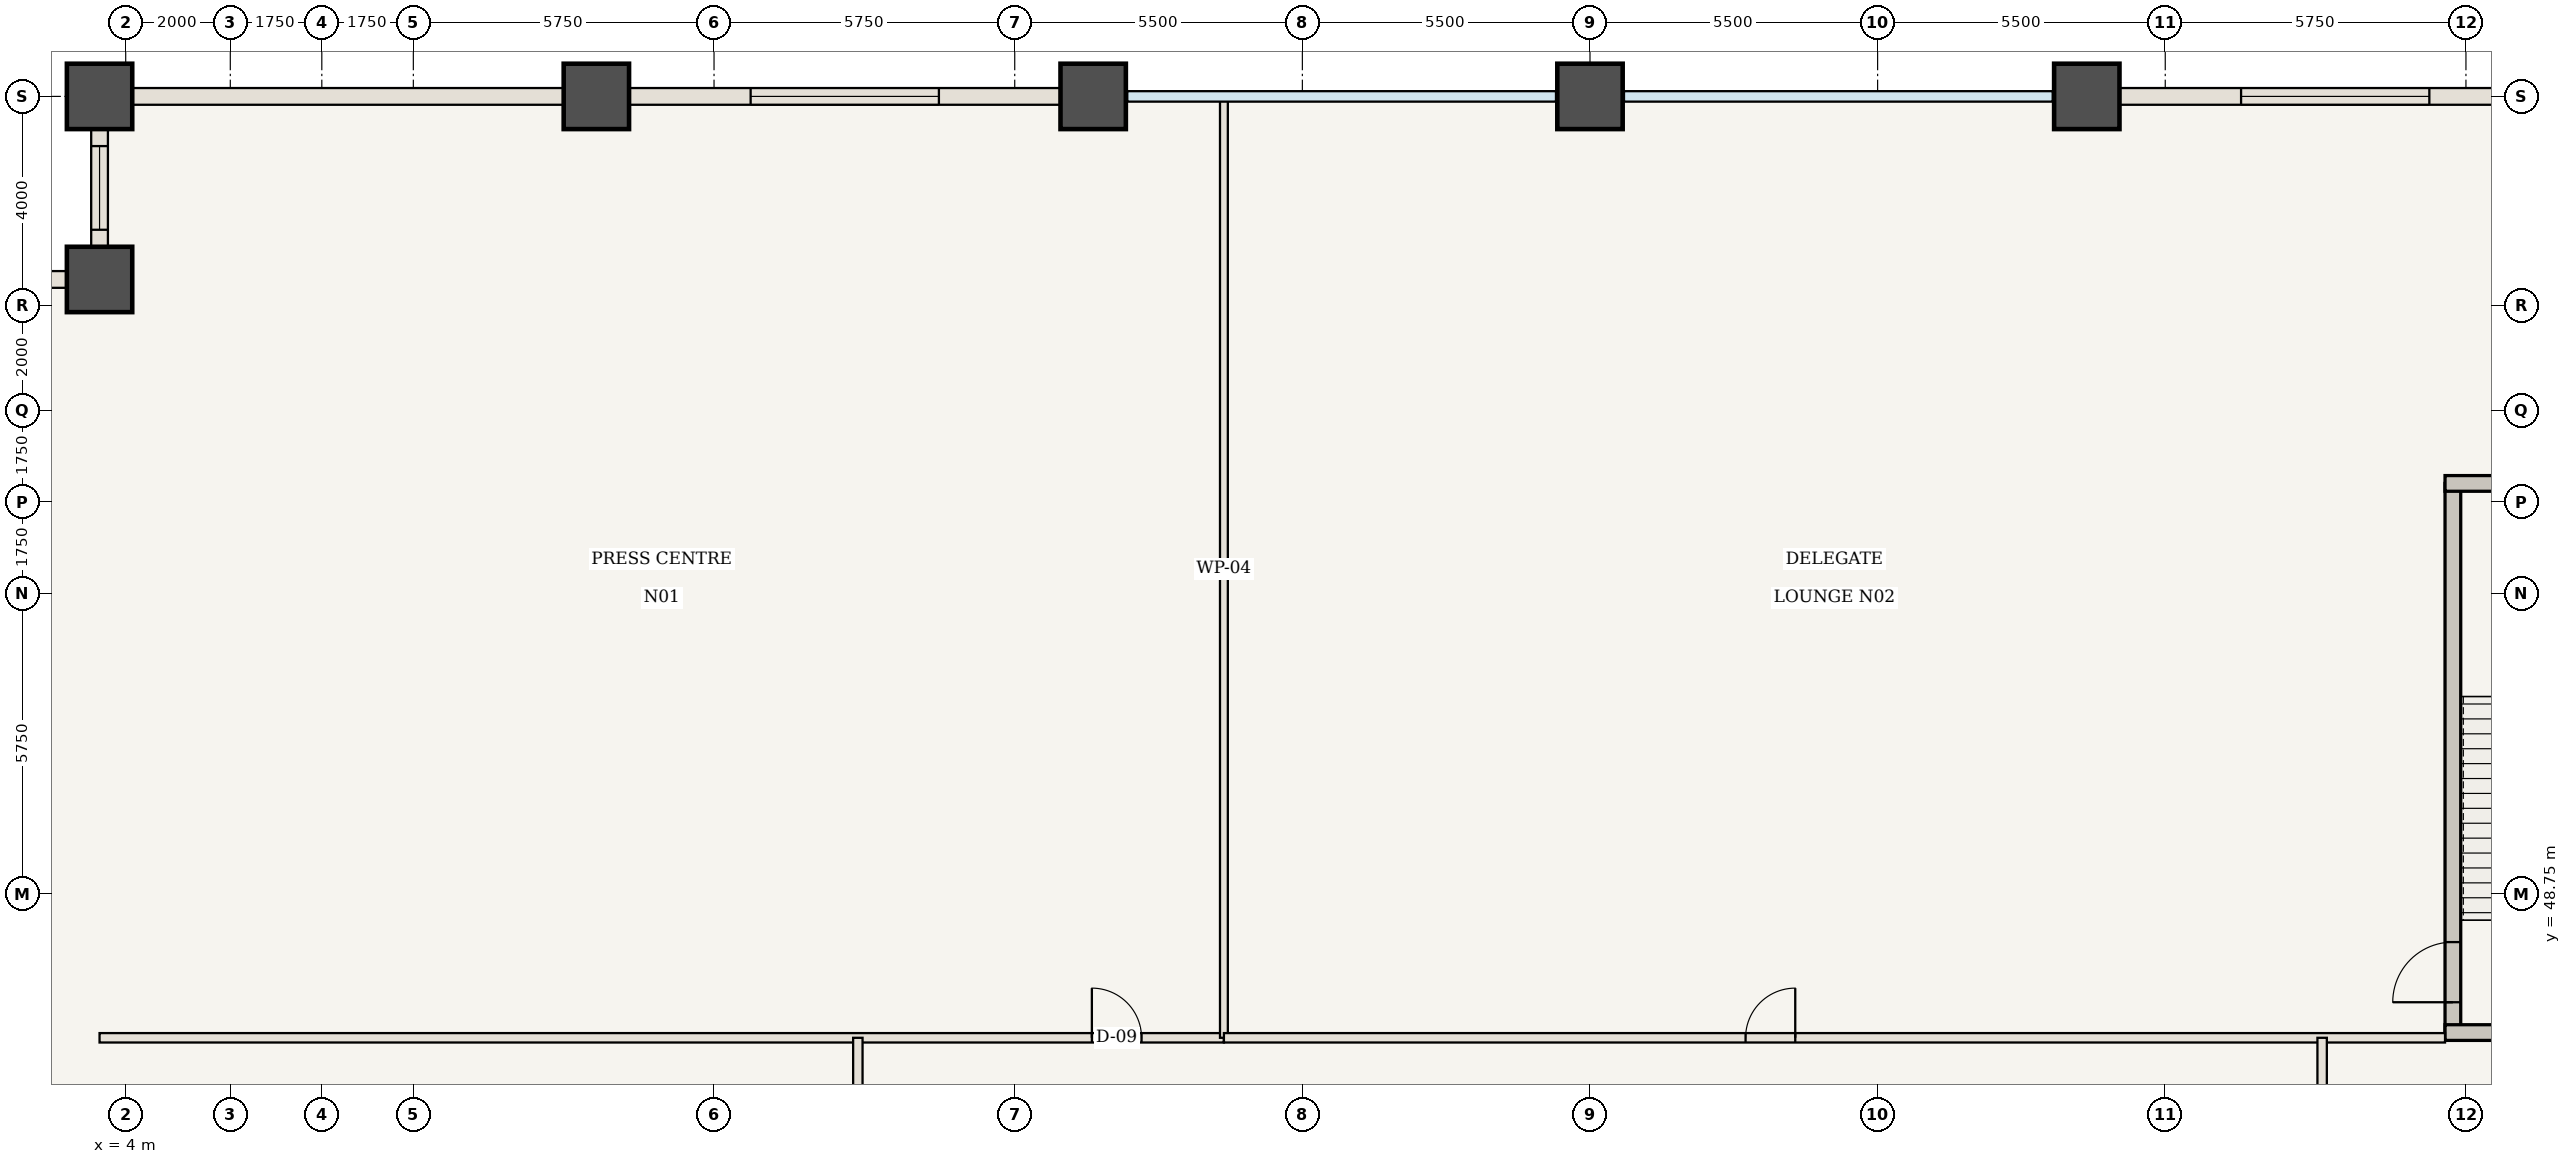
"""IFC4 building model, lengths in metres.
Left out: names, types, materials, properties, quantities, classifications, styles, units other than length and angle.
Written with IfcOpenShell. Run it as: python <this file> out.ifc"""

import sys

from ifc_helpers import new_model, si_unit, direction, frame, frame_2d, origin, origin_2d, place, context, subcontext, project, spatial, rectangle, extrude, element, fill, save


model = new_model("IFC4")
c1 = context("Model", 3, precision=1e-05, world=origin(), true_north=direction((0.0, 1.0)))
c2 = subcontext(c1, "Body", "Model", "MODEL_VIEW")
j1 = project(units=[si_unit("LENGTHUNIT", "METRE"), si_unit("PLANEANGLEUNIT", "RADIAN")], contexts=[c1])
p1 = place(None, origin())
s1 = spatial("IfcSite", under=j1, at=p1, CompositionType="ELEMENT")
p2 = place(p1, origin())
s2 = spatial("IfcBuilding", under=s1, at=p2, CompositionType="ELEMENT")
p3 = place(p2, frame((0.0, 0.0, 12.25)))
s3 = spatial("IfcBuildingStorey", under=s2, at=p3, CompositionType="ELEMENT", Elevation=12.25)
for number, where, z_axis, x_axis in (
    (1, (3.5, 64.0, 0.0), (0.0, 0.0, 1.0), (1.0, 0.0, 0.0)),
    (2, (3.5, 60.5, 0.0), (0.0, 0.0, 1.0), (1.0, 0.0, 0.0)),
    (3, (13.0, 64.0, 0.0), (0.0, 0.0, 1.0), (1.0, 0.0, 0.0)),
    (4, (22.5, 64.0, 0.0), (0.0, 0.0, 1.0), (1.0, 0.0, 0.0)),
    (5, (32.0, 64.0, 0.0), (0.0, 0.0, 1.0), (1.0, 0.0, 0.0)),
    (6, (41.5, 64.0, 0.0), (0.0, 0.0, 1.0), (1.0, 0.0, 0.0)),
):
    element("IfcColumn", number, at=place(p3, frame(where, z_axis=z_axis, x_axis=x_axis)), inside=s3, PredefinedType="COLUMN", context=c2, shape_type="SweptSolid", body=[
        extrude(rectangle(XDim=1.25, YDim=1.25, at=origin_2d()), origin(), (0.0, 0.0, 1.0), 5.6),
    ])
p4 = place(p3, frame((48.5, 46.1, 0.0), z_axis=(0.0, 0.0, 1.0), x_axis=(0.0, 1.0, 0.0)))
e7 = element("IfcWall", 7, at=p4, inside=s3, PredefinedType="SHEAR", context=c2, shape_type="SweptSolid", body=[
    extrude(rectangle(XDim=10.5, YDim=0.3, at=frame_2d((5.25, 0.0))), origin(), (0.0, 0.0, 1.0), 5.36),
])
p5 = place(p4, frame((0.58, 0.0, 0.0)))
e8 = element("IfcOpeningElement", 8, at=p5, cuts=e7, PredefinedType="OPENING", context=c2, shape_type="SweptSolid", body=[
    extrude(rectangle(XDim=1.15, YDim=2.15, at=frame_2d((0.575, 1.075))), frame((0.0, 0.16, 0.0), z_axis=(0.0, -1.0, 0.0), x_axis=(1.0, 0.0, 0.0)), (0.0, 0.0, 1.0), 0.32),
])
for number, where, z_axis, x_axis in (
    (9, (48.35, 46.1, 0.0), (0.0, 0.0, 1.0), (1.0, 0.0, 0.0)),
    (10, (48.35, 56.6, 0.0), (0.0, 0.0, 1.0), (1.0, 0.0, 0.0)),
):
    element("IfcWall", number, at=place(p3, frame(where, z_axis=z_axis, x_axis=x_axis)), inside=s3, PredefinedType="SHEAR", context=c2, shape_type="SweptSolid", body=[
        extrude(rectangle(XDim=4.75, YDim=0.3, at=frame_2d((2.375, 0.0))), origin(), (0.0, 0.0, 1.0), 5.36),
    ])
p6 = place(p3, frame((3.5, 46.0, 0.0), z_axis=(0.0, 0.0, 1.0), x_axis=(1.0, 0.0, 0.0)))
e11 = element("IfcWall", 11, at=p6, inside=s3, PredefinedType="STANDARD", context=c2, shape_type="SweptSolid", body=[
    extrude(rectangle(XDim=21.5, YDim=0.18, at=frame_2d((10.75, 0.0))), origin(), (0.0, 0.0, 1.0), 5.36),
])
p7 = place(p6, frame((18.975, 0.0, 0.0)))
e12 = element("IfcOpeningElement", 12, at=p7, cuts=e11, PredefinedType="OPENING", context=c2, shape_type="SweptSolid", body=[
    extrude(rectangle(XDim=0.95, YDim=2.15, at=frame_2d((0.475, 1.075))), frame((0.0, 0.1, 0.0), z_axis=(0.0, -1.0, 0.0), x_axis=(1.0, 0.0, 0.0)), (0.0, 0.0, 1.0), 0.2),
])
p8 = place(p3, frame((25.0, 46.0, 0.0), z_axis=(0.0, 0.0, 1.0), x_axis=(0.0, 1.0, 0.0)))
e13 = element("IfcWall", 13, at=p8, inside=s3, PredefinedType="STANDARD", context=c2, shape_type="SweptSolid", body=[
    extrude(rectangle(XDim=17.94, YDim=0.15, at=frame_2d((8.97, 0.0))), origin(), (0.0, 0.0, 1.0), 5.36),
])
p9 = place(p3, frame((25.0, 46.0, 0.0), z_axis=(0.0, 0.0, 1.0), x_axis=(1.0, 0.0, 0.0)))
e14 = element("IfcWall", 14, at=p9, inside=s3, PredefinedType="STANDARD", context=c2, shape_type="SweptSolid", body=[
    extrude(rectangle(XDim=23.35, YDim=0.18, at=frame_2d((11.675, 0.0))), origin(), (0.0, 0.0, 1.0), 5.36),
])
p10 = place(p9, frame((9.975, 0.0, 0.0)))
e15 = element("IfcOpeningElement", 15, at=p10, cuts=e14, PredefinedType="OPENING", context=c2, shape_type="SweptSolid", body=[
    extrude(rectangle(XDim=0.95, YDim=2.15, at=frame_2d((0.475, 1.075))), frame((0.0, 0.1, 0.0), z_axis=(0.0, -1.0, 0.0), x_axis=(1.0, 0.0, 0.0)), (0.0, 0.0, 1.0), 0.2),
])
p11 = place(p3, frame((18.0, 31.2, 0.0), z_axis=(0.0, 0.0, 1.0), x_axis=(0.0, 1.0, 0.0)))
e16 = element("IfcWall", 16, at=p11, inside=s3, PredefinedType="STANDARD", context=c2, shape_type="SweptSolid", body=[
    extrude(rectangle(XDim=14.8, YDim=0.18, at=frame_2d((7.4, 0.0))), origin(), (0.0, 0.0, 1.0), 5.36),
])
p12 = place(p11, frame((6.9, 0.0, 0.0)))
e17 = element("IfcOpeningElement", 17, at=p12, cuts=e16, PredefinedType="OPENING", context=c2, shape_type="SweptSolid", body=[
    extrude(rectangle(XDim=0.95, YDim=2.15, at=frame_2d((0.475, 1.075))), frame((0.0, 0.1, 0.0), z_axis=(0.0, -1.0, 0.0), x_axis=(1.0, 0.0, 0.0)), (0.0, 0.0, 1.0), 0.2),
])
p13 = place(p3, frame((46.0, 32.8, 0.0), z_axis=(0.0, 0.0, 1.0), x_axis=(0.0, 1.0, 0.0)))
e18 = element("IfcWall", 18, at=p13, inside=s3, PredefinedType="STANDARD", context=c2, shape_type="SweptSolid", body=[
    extrude(rectangle(XDim=13.2, YDim=0.18, at=frame_2d((6.6, 0.0))), origin(), (0.0, 0.0, 1.0), 5.36),
])
p14 = place(p13, frame((6.1, 0.0, 0.0)))
e19 = element("IfcOpeningElement", 19, at=p14, cuts=e18, PredefinedType="OPENING", context=c2, shape_type="SweptSolid", body=[
    extrude(rectangle(XDim=0.95, YDim=2.15, at=frame_2d((0.475, 1.075))), frame((0.0, 0.1, 0.0), z_axis=(0.0, -1.0, 0.0), x_axis=(1.0, 0.0, 0.0)), (0.0, 0.0, 1.0), 0.2),
])
p15 = place(p3, frame((3.5, 64.0, 0.0), z_axis=(0.0, 0.0, 1.0), x_axis=(1.0, 0.0, 0.0)))
e20 = element("IfcWall", 20, at=p15, inside=s3, PredefinedType="USERDEFINED", context=c2, shape_type="SweptSolid", body=[
    extrude(rectangle(XDim=9.5, YDim=0.32, at=frame_2d((4.75, 0.0))), origin(), (0.0, 0.0, 1.0), 4.46),
])
p16 = place(p3, frame((13.0, 64.0, 0.0), z_axis=(0.0, 0.0, 1.0), x_axis=(1.0, 0.0, 0.0)))
e21 = element("IfcWall", 21, at=p16, inside=s3, PredefinedType="USERDEFINED", context=c2, shape_type="SweptSolid", body=[
    extrude(rectangle(XDim=9.5, YDim=0.32, at=frame_2d((4.75, 0.0))), origin(), (0.0, 0.0, 1.0), 4.46),
])
p17 = place(p16, frame((2.95, 0.0, 0.85)))
e22 = element("IfcOpeningElement", 22, at=p17, cuts=e21, PredefinedType="OPENING", context=c2, shape_type="SweptSolid", body=[
    extrude(rectangle(XDim=3.6, YDim=2.6, at=frame_2d((1.8, 1.3))), frame((0.0, 0.17, 0.0), z_axis=(0.0, -1.0, 0.0), x_axis=(1.0, 0.0, 0.0)), (0.0, 0.0, 1.0), 0.34),
])
p18 = place(p3, frame((41.5, 64.0, 0.0), z_axis=(0.0, 0.0, 1.0), x_axis=(1.0, 0.0, 0.0)))
e23 = element("IfcWall", 23, at=p18, inside=s3, PredefinedType="USERDEFINED", context=c2, shape_type="SweptSolid", body=[
    extrude(rectangle(XDim=9.5, YDim=0.32, at=frame_2d((4.75, 0.0))), origin(), (0.0, 0.0, 1.0), 4.46),
])
p19 = place(p18, frame((2.95, 0.0, 0.85)))
e24 = element("IfcOpeningElement", 24, at=p19, cuts=e23, PredefinedType="OPENING", context=c2, shape_type="SweptSolid", body=[
    extrude(rectangle(XDim=3.6, YDim=2.6, at=frame_2d((1.8, 1.3))), frame((0.0, 0.17, 0.0), z_axis=(0.0, -1.0, 0.0), x_axis=(1.0, 0.0, 0.0)), (0.0, 0.0, 1.0), 0.34),
])
p20 = place(p3, frame((3.5, 60.5, 0.0), z_axis=(0.0, 0.0, 1.0), x_axis=(0.0, 1.0, 0.0)))
e25 = element("IfcWall", 25, at=p20, inside=s3, PredefinedType="USERDEFINED", context=c2, shape_type="SweptSolid", body=[
    extrude(rectangle(XDim=3.5, YDim=0.32, at=frame_2d((1.75, 0.0))), origin(), (0.0, 0.0, 1.0), 4.46),
])
p21 = place(p20, frame((0.95, 0.0, 0.85)))
e26 = element("IfcOpeningElement", 26, at=p21, cuts=e25, PredefinedType="OPENING", context=c2, shape_type="SweptSolid", body=[
    extrude(rectangle(XDim=1.6, YDim=2.05, at=frame_2d((0.8, 1.025))), frame((0.0, 0.17, 0.0), z_axis=(0.0, -1.0, 0.0), x_axis=(1.0, 0.0, 0.0)), (0.0, 0.0, 1.0), 0.34),
])
p22 = place(p3, frame((0.0, 60.5, 0.0), z_axis=(0.0, 0.0, 1.0), x_axis=(1.0, 0.0, 0.0)))
e27 = element("IfcWall", 27, at=p22, inside=s3, PredefinedType="USERDEFINED", context=c2, shape_type="SweptSolid", body=[
    extrude(rectangle(XDim=3.5, YDim=0.32, at=frame_2d((1.75, 0.0))), origin(), (0.0, 0.0, 1.0), 4.46),
])
p23 = place(p22, frame((0.95, 0.0, 0.85)))
e28 = element("IfcOpeningElement", 28, at=p23, cuts=e27, PredefinedType="OPENING", context=c2, shape_type="SweptSolid", body=[
    extrude(rectangle(XDim=1.6, YDim=2.05, at=frame_2d((0.8, 1.025))), frame((0.0, 0.17, 0.0), z_axis=(0.0, -1.0, 0.0), x_axis=(1.0, 0.0, 0.0)), (0.0, 0.0, 1.0), 0.34),
])
p24 = place(p5, origin())
e29 = element("IfcDoor", 29, at=p24, inside=s3, OperationType="SINGLE_SWING_LEFT", PredefinedType="DOOR", context=c2, shape_type="SweptSolid", body=[
    extrude(rectangle(XDim=1.15, YDim=2.15, at=frame_2d((0.575, 1.075))), frame((0.0, 0.025, 0.0), z_axis=(0.0, -1.0, 0.0), x_axis=(1.0, 0.0, 0.0)), (0.0, 0.0, 1.0), 0.05),
])
fill(e8, e29)
p25 = place(p7, origin())
e30 = element("IfcDoor", 30, at=p25, inside=s3, OperationType="SINGLE_SWING_LEFT", PredefinedType="DOOR", context=c2, shape_type="SweptSolid", body=[
    extrude(rectangle(XDim=0.95, YDim=2.15, at=frame_2d((0.475, 1.075))), frame((0.0, 0.025, 0.0), z_axis=(0.0, -1.0, 0.0), x_axis=(1.0, 0.0, 0.0)), (0.0, 0.0, 1.0), 0.05),
])
fill(e12, e30)
p26 = place(p10, origin())
e31 = element("IfcDoor", 31, at=p26, inside=s3, OperationType="SINGLE_SWING_RIGHT", PredefinedType="DOOR", context=c2, shape_type="SweptSolid", body=[
    extrude(rectangle(XDim=0.95, YDim=2.15, at=frame_2d((0.475, 1.075))), frame((0.0, 0.025, 0.0), z_axis=(0.0, -1.0, 0.0), x_axis=(1.0, 0.0, 0.0)), (0.0, 0.0, 1.0), 0.05),
])
fill(e15, e31)
p27 = place(p17, origin())
e32 = element("IfcWindow", 32, at=p27, inside=s3, PartitioningType="SINGLE_PANEL", PredefinedType="WINDOW", context=c2, shape_type="SweptSolid", body=[
    extrude(rectangle(XDim=3.6, YDim=2.6, at=frame_2d((1.8, 1.3))), frame((0.0, 0.03, 0.0), z_axis=(0.0, -1.0, 0.0), x_axis=(1.0, 0.0, 0.0)), (0.0, 0.0, 1.0), 0.06),
])
fill(e22, e32)
p28 = place(p19, origin())
e33 = element("IfcWindow", 33, at=p28, inside=s3, PartitioningType="SINGLE_PANEL", PredefinedType="WINDOW", context=c2, shape_type="SweptSolid", body=[
    extrude(rectangle(XDim=3.6, YDim=2.6, at=frame_2d((1.8, 1.3))), frame((0.0, 0.03, 0.0), z_axis=(0.0, -1.0, 0.0), x_axis=(1.0, 0.0, 0.0)), (0.0, 0.0, 1.0), 0.06),
])
fill(e24, e33)
p29 = place(p21, origin())
e34 = element("IfcWindow", 34, at=p29, inside=s3, PartitioningType="SINGLE_PANEL", PredefinedType="WINDOW", context=c2, shape_type="SweptSolid", body=[
    extrude(rectangle(XDim=1.6, YDim=2.05, at=frame_2d((0.8, 1.025))), frame((0.0, 0.03, 0.0), z_axis=(0.0, -1.0, 0.0), x_axis=(1.0, 0.0, 0.0)), (0.0, 0.0, 1.0), 0.06),
])
fill(e26, e34)
save(model, sys.argv[1])
